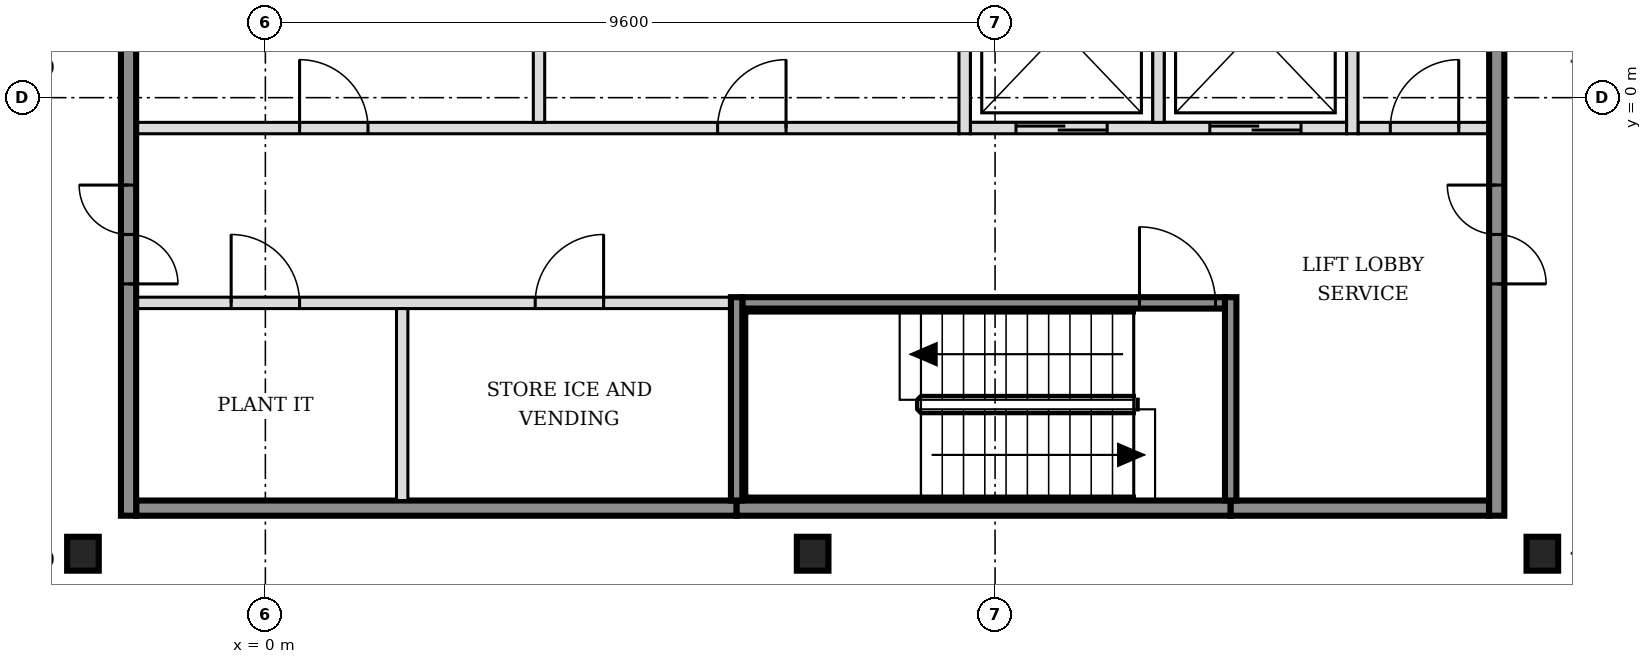
"""IFC4 building model, lengths in metres.
Left out: names, types, materials, properties, quantities, classifications, styles, units other than length and angle.
Written with IfcOpenShell. Run it as: python <this file> out.ifc"""

import sys

from ifc_helpers import new_model, si_unit, direction, frame, frame_2d, origin, origin_2d, place, context, subcontext, project, spatial, rectangle, i_section, extrude, element, fill, save


model = new_model("IFC4")
c1 = context("Model", 3, precision=1e-05, world=origin(), true_north=direction((0.0, 1.0)))
c2 = subcontext(c1, "Body", "Model", "MODEL_VIEW")
j1 = project(units=[si_unit("LENGTHUNIT", "METRE"), si_unit("PLANEANGLEUNIT", "RADIAN")], contexts=[c1])
p1 = place(None, origin())
s1 = spatial("IfcSite", under=j1, at=p1, CompositionType="ELEMENT")
p2 = place(p1, origin())
s2 = spatial("IfcBuilding", under=s1, at=p2, CompositionType="ELEMENT")
p3 = place(p2, frame((0.0, 0.0, 150.6)))
s3 = spatial("IfcBuildingStorey", under=s2, at=p3, CompositionType="ELEMENT", Elevation=150.6)
for number, where, z_axis, x_axis in (
    (1, (-2.4, -6.0, -0.15), (0.0, 0.0, 1.0), (1.0, 0.0, 0.0)),
    (2, (7.2, -6.0, -0.15), (0.0, 0.0, 1.0), (1.0, 0.0, 0.0)),
    (3, (16.8, -6.0, -0.15), (0.0, 0.0, 1.0), (1.0, 0.0, 0.0)),
):
    element("IfcColumn", number, at=place(p3, frame(where, z_axis=z_axis, x_axis=x_axis)), inside=s3, PredefinedType="COLUMN", context=c2, shape_type="SweptSolid", body=[
        extrude(i_section(OverallWidth=0.416, OverallDepth=0.446, WebThickness=0.039, FlangeThickness=0.063, FilletRadius=0.015, at=origin_2d()), origin(), (0.0, 0.0, 1.0), 3.6),
    ])
p4 = place(p3, frame((-1.7, -5.4, 0.0), z_axis=(0.0, 0.0, 1.0), x_axis=(1.0, 0.0, 0.0)))
e4 = element("IfcWall", 4, at=p4, inside=s3, PredefinedType="SOLIDWALL", context=c2, shape_type="SweptSolid", body=[
    extrude(rectangle(XDim=7.9, YDim=0.2, at=frame_2d((3.95, 0.0))), origin(), (0.0, 0.0, 1.0), 3.45),
])
p5 = place(p3, frame((6.2, -5.4, 0.0), z_axis=(0.0, 0.0, 1.0), x_axis=(1.0, 0.0, 0.0)))
e5 = element("IfcWall", 5, at=p5, inside=s3, PredefinedType="SOLIDWALL", context=c2, shape_type="SweptSolid", body=[
    extrude(rectangle(XDim=6.5, YDim=0.2, at=frame_2d((3.25, 0.0))), origin(), (0.0, 0.0, 1.0), 3.45),
])
p6 = place(p3, frame((12.7, -5.4, 0.0), z_axis=(0.0, 0.0, 1.0), x_axis=(1.0, 0.0, 0.0)))
e6 = element("IfcWall", 6, at=p6, inside=s3, PredefinedType="SOLIDWALL", context=c2, shape_type="SweptSolid", body=[
    extrude(rectangle(XDim=3.4, YDim=0.2, at=frame_2d((1.7, 0.0))), origin(), (0.0, 0.0, 1.0), 3.45),
])
p7 = place(p3, frame((-1.7, -2.7, 0.0), z_axis=(0.0, 0.0, 1.0), x_axis=(1.0, 0.0, 0.0)))
e7 = element("IfcWall", 7, at=p7, inside=s3, PredefinedType="PARTITIONING", context=c2, shape_type="SweptSolid", body=[
    extrude(rectangle(XDim=7.825, YDim=0.15, at=frame_2d((3.913, 0.0))), origin(), (0.0, 0.0, 1.0), 3.45),
])
p8 = place(p7, frame((1.25, 0.0, 0.0)))
e8 = element("IfcOpeningElement", 8, at=p8, cuts=e7, PredefinedType="OPENING", context=c2, shape_type="SweptSolid", body=[
    extrude(rectangle(XDim=0.9, YDim=2.1, at=frame_2d((0.45, 1.05))), frame((0.0, 0.085, 0.0), z_axis=(0.0, -1.0, 0.0), x_axis=(1.0, 0.0, 0.0)), (0.0, 0.0, 1.0), 0.17),
])
p9 = place(p7, frame((5.25, 0.0, 0.0)))
e9 = element("IfcOpeningElement", 9, at=p9, cuts=e7, PredefinedType="OPENING", context=c2, shape_type="SweptSolid", body=[
    extrude(rectangle(XDim=0.9, YDim=2.1, at=frame_2d((0.45, 1.05))), frame((0.0, 0.085, 0.0), z_axis=(0.0, -1.0, 0.0), x_axis=(1.0, 0.0, 0.0)), (0.0, 0.0, 1.0), 0.17),
])
p10 = place(p3, frame((6.275, -2.7, 0.0), z_axis=(0.0, 0.0, 1.0), x_axis=(1.0, 0.0, 0.0)))
e10 = element("IfcWall", 10, at=p10, inside=s3, PredefinedType="SOLIDWALL", context=c2, shape_type="SweptSolid", body=[
    extrude(rectangle(XDim=6.35, YDim=0.15, at=frame_2d((3.175, 0.0))), origin(), (0.0, 0.0, 1.0), 3.45),
])
p11 = place(p10, frame((5.225, 0.0, 0.0)))
e11 = element("IfcOpeningElement", 11, at=p11, cuts=e10, PredefinedType="OPENING", context=c2, shape_type="SweptSolid", body=[
    extrude(rectangle(XDim=1.0, YDim=2.1, at=frame_2d((0.5, 1.05))), frame((0.0, 0.085, 0.0), z_axis=(0.0, -1.0, 0.0), x_axis=(1.0, 0.0, 0.0)), (0.0, 0.0, 1.0), 0.17),
])
p12 = place(p3, frame((-1.7, -0.4, 0.0), z_axis=(0.0, 0.0, 1.0), x_axis=(1.0, 0.0, 0.0)))
e12 = element("IfcWall", 12, at=p12, inside=s3, PredefinedType="PARTITIONING", context=c2, shape_type="SweptSolid", body=[
    extrude(rectangle(XDim=10.825, YDim=0.15, at=frame_2d((5.413, 0.0))), origin(), (0.0, 0.0, 1.0), 3.45),
])
p13 = place(p12, frame((2.15, 0.0, 0.0)))
e13 = element("IfcOpeningElement", 13, at=p13, cuts=e12, PredefinedType="OPENING", context=c2, shape_type="SweptSolid", body=[
    extrude(rectangle(XDim=0.9, YDim=2.1, at=frame_2d((0.45, 1.05))), frame((0.0, 0.085, 0.0), z_axis=(0.0, -1.0, 0.0), x_axis=(1.0, 0.0, 0.0)), (0.0, 0.0, 1.0), 0.17),
])
p14 = place(p12, frame((7.65, 0.0, 0.0)))
e14 = element("IfcOpeningElement", 14, at=p14, cuts=e12, PredefinedType="OPENING", context=c2, shape_type="SweptSolid", body=[
    extrude(rectangle(XDim=0.9, YDim=2.1, at=frame_2d((0.45, 1.05))), frame((0.0, 0.085, 0.0), z_axis=(0.0, -1.0, 0.0), x_axis=(1.0, 0.0, 0.0)), (0.0, 0.0, 1.0), 0.17),
])
p15 = place(p3, frame((9.275, -0.4, 0.0), z_axis=(0.0, 0.0, 1.0), x_axis=(1.0, 0.0, 0.0)))
e15 = element("IfcWall", 15, at=p15, inside=s3, PredefinedType="SOLIDWALL", context=c2, shape_type="SweptSolid", body=[
    extrude(rectangle(XDim=4.95, YDim=0.15, at=frame_2d((2.475, 0.0))), origin(), (0.0, 0.0, 1.0), 3.45),
])
p16 = place(p15, frame((0.6, 0.0, 0.0)))
e16 = element("IfcOpeningElement", 16, at=p16, cuts=e15, PredefinedType="OPENING", context=c2, shape_type="SweptSolid", body=[
    extrude(rectangle(XDim=1.2, YDim=2.1, at=frame_2d((0.6, 1.05))), frame((0.0, 0.085, 0.0), z_axis=(0.0, -1.0, 0.0), x_axis=(1.0, 0.0, 0.0)), (0.0, 0.0, 1.0), 0.17),
])
p17 = place(p15, frame((3.15, 0.0, 0.0)))
e17 = element("IfcOpeningElement", 17, at=p17, cuts=e15, PredefinedType="OPENING", context=c2, shape_type="SweptSolid", body=[
    extrude(rectangle(XDim=1.2, YDim=2.1, at=frame_2d((0.6, 1.05))), frame((0.0, 0.085, 0.0), z_axis=(0.0, -1.0, 0.0), x_axis=(1.0, 0.0, 0.0)), (0.0, 0.0, 1.0), 0.17),
])
p18 = place(p3, frame((14.375, -0.4, 0.0), z_axis=(0.0, 0.0, 1.0), x_axis=(1.0, 0.0, 0.0)))
e18 = element("IfcWall", 18, at=p18, inside=s3, PredefinedType="PARTITIONING", context=c2, shape_type="SweptSolid", body=[
    extrude(rectangle(XDim=1.725, YDim=0.15, at=frame_2d((0.863, 0.0))), origin(), (0.0, 0.0, 1.0), 3.45),
])
p19 = place(p18, frame((0.425, 0.0, 0.0)))
e19 = element("IfcOpeningElement", 19, at=p19, cuts=e18, PredefinedType="OPENING", context=c2, shape_type="SweptSolid", body=[
    extrude(rectangle(XDim=0.9, YDim=2.1, at=frame_2d((0.45, 1.05))), frame((0.0, 0.085, 0.0), z_axis=(0.0, -1.0, 0.0), x_axis=(1.0, 0.0, 0.0)), (0.0, 0.0, 1.0), 0.17),
])
p20 = place(p3, frame((-1.8, -5.5, 0.0), z_axis=(0.0, 0.0, 1.0), x_axis=(0.0, 1.0, 0.0)))
e20 = element("IfcWall", 20, at=p20, inside=s3, PredefinedType="SOLIDWALL", context=c2, shape_type="SweptSolid", body=[
    extrude(rectangle(XDim=15.8, YDim=0.2, at=frame_2d((7.9, 0.0))), origin(), (0.0, 0.0, 1.0), 3.45),
])
p21 = place(p20, frame((3.05, 0.0, 0.0)))
e21 = element("IfcOpeningElement", 21, at=p21, cuts=e20, PredefinedType="OPENING", context=c2, shape_type="SweptSolid", body=[
    extrude(rectangle(XDim=1.3, YDim=2.1, at=frame_2d((0.65, 1.05))), frame((0.0, 0.11, 0.0), z_axis=(0.0, -1.0, 0.0), x_axis=(1.0, 0.0, 0.0)), (0.0, 0.0, 1.0), 0.22),
])
p22 = place(p20, frame((11.45, 0.0, 0.0)))
e22 = element("IfcOpeningElement", 22, at=p22, cuts=e20, PredefinedType="OPENING", context=c2, shape_type="SweptSolid", body=[
    extrude(rectangle(XDim=1.3, YDim=2.1, at=frame_2d((0.65, 1.05))), frame((0.0, 0.11, 0.0), z_axis=(0.0, -1.0, 0.0), x_axis=(1.0, 0.0, 0.0)), (0.0, 0.0, 1.0), 0.22),
])
p23 = place(p3, frame((1.8, -5.3, 0.0), z_axis=(0.0, 0.0, 1.0), x_axis=(0.0, 1.0, 0.0)))
e23 = element("IfcWall", 23, at=p23, inside=s3, PredefinedType="PARTITIONING", context=c2, shape_type="SweptSolid", body=[
    extrude(rectangle(XDim=2.525, YDim=0.15, at=frame_2d((1.263, 0.0))), origin(), (0.0, 0.0, 1.0), 3.45),
])
p24 = place(p3, frame((3.6, -0.325, 0.0), z_axis=(0.0, 0.0, 1.0), x_axis=(0.0, 1.0, 0.0)))
e24 = element("IfcWall", 24, at=p24, inside=s3, PredefinedType="PARTITIONING", context=c2, shape_type="SweptSolid", body=[
    extrude(rectangle(XDim=2.45, YDim=0.15, at=frame_2d((1.225, 0.0))), origin(), (0.0, 0.0, 1.0), 3.45),
])
p25 = place(p3, frame((6.2, -5.3, 0.0), z_axis=(0.0, 0.0, 1.0), x_axis=(0.0, 1.0, 0.0)))
e25 = element("IfcWall", 25, at=p25, inside=s3, PredefinedType="SOLIDWALL", context=c2, shape_type="SweptSolid", body=[
    extrude(rectangle(XDim=2.675, YDim=0.15, at=frame_2d((1.337, 0.0))), origin(), (0.0, 0.0, 1.0), 3.45),
])
p26 = place(p3, frame((9.2, -0.475, 0.0), z_axis=(0.0, 0.0, 1.0), x_axis=(0.0, 1.0, 0.0)))
e26 = element("IfcWall", 26, at=p26, inside=s3, PredefinedType="SOLIDWALL", context=c2, shape_type="SweptSolid", body=[
    extrude(rectangle(XDim=2.6, YDim=0.15, at=frame_2d((1.3, 0.0))), origin(), (0.0, 0.0, 1.0), 3.45),
])
p27 = place(p3, frame((11.75, -0.325, 0.0), z_axis=(0.0, 0.0, 1.0), x_axis=(0.0, 1.0, 0.0)))
e27 = element("IfcWall", 27, at=p27, inside=s3, PredefinedType="SOLIDWALL", context=c2, shape_type="SweptSolid", body=[
    extrude(rectangle(XDim=2.45, YDim=0.15, at=frame_2d((1.225, 0.0))), origin(), (0.0, 0.0, 1.0), 3.45),
])
p28 = place(p3, frame((12.7, -5.3, 0.0), z_axis=(0.0, 0.0, 1.0), x_axis=(0.0, 1.0, 0.0)))
e28 = element("IfcWall", 28, at=p28, inside=s3, PredefinedType="SOLIDWALL", context=c2, shape_type="SweptSolid", body=[
    extrude(rectangle(XDim=2.675, YDim=0.15, at=frame_2d((1.337, 0.0))), origin(), (0.0, 0.0, 1.0), 3.45),
])
p29 = place(p3, frame((14.3, -0.475, 0.0), z_axis=(0.0, 0.0, 1.0), x_axis=(0.0, 1.0, 0.0)))
e29 = element("IfcWall", 29, at=p29, inside=s3, PredefinedType="SOLIDWALL", context=c2, shape_type="SweptSolid", body=[
    extrude(rectangle(XDim=2.75, YDim=0.15, at=frame_2d((1.375, 0.0))), origin(), (0.0, 0.0, 1.0), 3.45),
])
p30 = place(p3, frame((16.2, -5.5, 0.0), z_axis=(0.0, 0.0, 1.0), x_axis=(0.0, 1.0, 0.0)))
e30 = element("IfcWall", 30, at=p30, inside=s3, PredefinedType="SOLIDWALL", context=c2, shape_type="SweptSolid", body=[
    extrude(rectangle(XDim=15.8, YDim=0.2, at=frame_2d((7.9, 0.0))), origin(), (0.0, 0.0, 1.0), 3.45),
])
p31 = place(p30, frame((3.05, 0.0, 0.0)))
e31 = element("IfcOpeningElement", 31, at=p31, cuts=e30, PredefinedType="OPENING", context=c2, shape_type="SweptSolid", body=[
    extrude(rectangle(XDim=1.3, YDim=2.1, at=frame_2d((0.65, 1.05))), frame((0.0, 0.11, 0.0), z_axis=(0.0, -1.0, 0.0), x_axis=(1.0, 0.0, 0.0)), (0.0, 0.0, 1.0), 0.22),
])
p32 = place(p30, frame((11.45, 0.0, 0.0)))
e32 = element("IfcOpeningElement", 32, at=p32, cuts=e30, PredefinedType="OPENING", context=c2, shape_type="SweptSolid", body=[
    extrude(rectangle(XDim=1.3, YDim=2.1, at=frame_2d((0.65, 1.05))), frame((0.0, 0.11, 0.0), z_axis=(0.0, -1.0, 0.0), x_axis=(1.0, 0.0, 0.0)), (0.0, 0.0, 1.0), 0.22),
])
p33 = place(p16, origin())
e33 = element("IfcDoor", 33, at=p33, inside=s3, OperationType="DOUBLE_DOOR_SLIDING", PredefinedType="DOOR", context=c2, shape_type="SweptSolid", body=[
    extrude(rectangle(XDim=1.2, YDim=2.1, at=frame_2d((0.6, 1.05))), frame((0.0, 0.025, 0.0), z_axis=(0.0, -1.0, 0.0), x_axis=(1.0, 0.0, 0.0)), (0.0, 0.0, 1.0), 0.05),
])
fill(e16, e33)
p34 = place(p17, origin())
e34 = element("IfcDoor", 34, at=p34, inside=s3, OperationType="DOUBLE_DOOR_SLIDING", PredefinedType="DOOR", context=c2, shape_type="SweptSolid", body=[
    extrude(rectangle(XDim=1.2, YDim=2.1, at=frame_2d((0.6, 1.05))), frame((0.0, 0.025, 0.0), z_axis=(0.0, -1.0, 0.0), x_axis=(1.0, 0.0, 0.0)), (0.0, 0.0, 1.0), 0.05),
])
fill(e17, e34)
p35 = place(p11, origin())
e35 = element("IfcDoor", 35, at=p35, inside=s3, OperationType="SINGLE_SWING_LEFT", PredefinedType="DOOR", context=c2, shape_type="SweptSolid", body=[
    extrude(rectangle(XDim=1.0, YDim=2.1, at=frame_2d((0.5, 1.05))), frame((0.0, 0.025, 0.0), z_axis=(0.0, -1.0, 0.0), x_axis=(1.0, 0.0, 0.0)), (0.0, 0.0, 1.0), 0.05),
])
fill(e11, e35)
p36 = place(p21, origin())
e36 = element("IfcDoor", 36, at=p36, inside=s3, OperationType="DOUBLE_DOOR_SINGLE_SWING", PredefinedType="DOOR", context=c2, shape_type="SweptSolid", body=[
    extrude(rectangle(XDim=1.3, YDim=2.1, at=frame_2d((0.65, 1.05))), frame((0.0, 0.025, 0.0), z_axis=(0.0, -1.0, 0.0), x_axis=(1.0, 0.0, 0.0)), (0.0, 0.0, 1.0), 0.05),
])
fill(e21, e36)
p37 = place(p31, origin())
e37 = element("IfcDoor", 37, at=p37, inside=s3, OperationType="DOUBLE_DOOR_SINGLE_SWING", PredefinedType="DOOR", context=c2, shape_type="SweptSolid", body=[
    extrude(rectangle(XDim=1.3, YDim=2.1, at=frame_2d((0.65, 1.05))), frame((0.0, 0.025, 0.0), z_axis=(0.0, -1.0, 0.0), x_axis=(1.0, 0.0, 0.0)), (0.0, 0.0, 1.0), 0.05),
])
fill(e31, e37)
p38 = place(p19, origin())
e38 = element("IfcDoor", 38, at=p38, inside=s3, OperationType="SINGLE_SWING_RIGHT", PredefinedType="DOOR", context=c2, shape_type="SweptSolid", body=[
    extrude(rectangle(XDim=0.9, YDim=2.1, at=frame_2d((0.45, 1.05))), frame((0.0, 0.025, 0.0), z_axis=(0.0, -1.0, 0.0), x_axis=(1.0, 0.0, 0.0)), (0.0, 0.0, 1.0), 0.05),
])
fill(e19, e38)
p39 = place(p8, origin())
e39 = element("IfcDoor", 39, at=p39, inside=s3, OperationType="SINGLE_SWING_LEFT", PredefinedType="DOOR", context=c2, shape_type="SweptSolid", body=[
    extrude(rectangle(XDim=0.9, YDim=2.1, at=frame_2d((0.45, 1.05))), frame((0.0, 0.025, 0.0), z_axis=(0.0, -1.0, 0.0), x_axis=(1.0, 0.0, 0.0)), (0.0, 0.0, 1.0), 0.05),
])
fill(e8, e39)
p40 = place(p9, origin())
e40 = element("IfcDoor", 40, at=p40, inside=s3, OperationType="SINGLE_SWING_RIGHT", PredefinedType="DOOR", context=c2, shape_type="SweptSolid", body=[
    extrude(rectangle(XDim=0.9, YDim=2.1, at=frame_2d((0.45, 1.05))), frame((0.0, 0.025, 0.0), z_axis=(0.0, -1.0, 0.0), x_axis=(1.0, 0.0, 0.0)), (0.0, 0.0, 1.0), 0.05),
])
fill(e9, e40)
p41 = place(p13, origin())
e41 = element("IfcDoor", 41, at=p41, inside=s3, OperationType="SINGLE_SWING_LEFT", PredefinedType="DOOR", context=c2, shape_type="SweptSolid", body=[
    extrude(rectangle(XDim=0.9, YDim=2.1, at=frame_2d((0.45, 1.05))), frame((0.0, 0.025, 0.0), z_axis=(0.0, -1.0, 0.0), x_axis=(1.0, 0.0, 0.0)), (0.0, 0.0, 1.0), 0.05),
])
fill(e13, e41)
p42 = place(p14, origin())
e42 = element("IfcDoor", 42, at=p42, inside=s3, OperationType="SINGLE_SWING_RIGHT", PredefinedType="DOOR", context=c2, shape_type="SweptSolid", body=[
    extrude(rectangle(XDim=0.9, YDim=2.1, at=frame_2d((0.45, 1.05))), frame((0.0, 0.025, 0.0), z_axis=(0.0, -1.0, 0.0), x_axis=(1.0, 0.0, 0.0)), (0.0, 0.0, 1.0), 0.05),
])
fill(e14, e42)
save(model, sys.argv[1])
